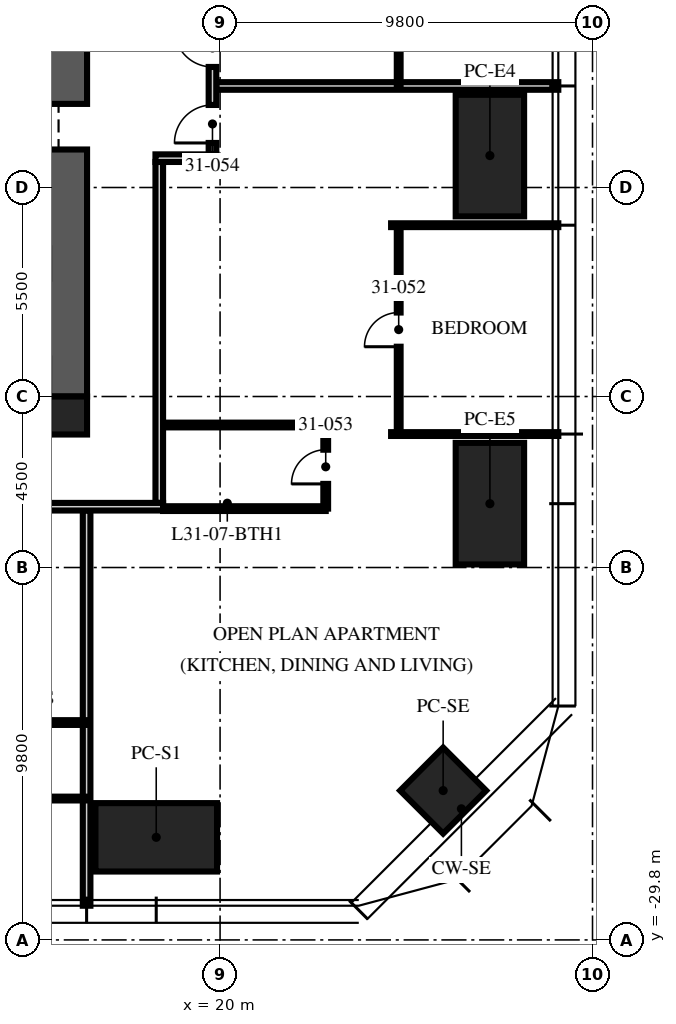
"""IFC4 building model, lengths in metres.
Left out: names, types, materials, properties, quantities, classifications, styles, units other than length and angle.
Written with IfcOpenShell. Run it as: python <this file> out.ifc"""

import sys

from ifc_helpers import new_model, si_unit, direction, frame, frame_2d, origin, origin_2d, place, context, subcontext, project, spatial, rectangle, extrude, element, fill, save


model = new_model("IFC4")
c1 = context("Model", 3, precision=1e-05, world=origin(), true_north=direction((0.0, 1.0)))
c2 = subcontext(c1, "Body", "Model", "MODEL_VIEW")
j1 = project(units=[si_unit("LENGTHUNIT", "METRE"), si_unit("PLANEANGLEUNIT", "RADIAN")], contexts=[c1])
p1 = place(None, origin())
s1 = spatial("IfcSite", under=j1, at=p1, CompositionType="ELEMENT")
p2 = place(p1, origin())
s2 = spatial("IfcBuilding", under=s1, at=p2, CompositionType="ELEMENT")
p3 = place(p2, frame((0.0, 0.0, 126.0)))
s3 = spatial("IfcBuildingStorey", under=s2, at=p3, CompositionType="ELEMENT", Elevation=126.0)
p4 = place(p3, frame((15.5, -15.5, -0.25), z_axis=(0.0, 0.0, 1.0), x_axis=(0.0, 1.0, 0.0)))
e1 = element("IfcWall", 1, at=p4, inside=s3, PredefinedType="SHEAR", context=c2, shape_type="SweptSolid", body=[
    extrude(rectangle(XDim=31.0, YDim=2.0, at=frame_2d((15.5, 0.0))), origin(), (0.0, 0.0, 1.0), 3.75),
])
p5 = place(p4, frame((6.5, 0.0, 0.25)))
e2 = element("IfcOpeningElement", 2, at=p5, cuts=e1, PredefinedType="OPENING", context=c2, shape_type="SweptSolid", body=[
    extrude(rectangle(XDim=1.2, YDim=2.1, at=frame_2d((0.6, 1.05))), frame((0.0, 1.01, 0.0), z_axis=(0.0, -1.0, 0.0), x_axis=(1.0, 0.0, 0.0)), (0.0, 0.0, 1.0), 2.02),
])
p6 = place(p4, frame((23.0, 0.0, 0.25)))
e3 = element("IfcOpeningElement", 3, at=p6, cuts=e1, PredefinedType="OPENING", context=c2, shape_type="SweptSolid", body=[
    extrude(rectangle(XDim=1.8, YDim=2.1, at=frame_2d((0.9, 1.05))), frame((0.0, 1.01, 0.0), z_axis=(0.0, -1.0, 0.0), x_axis=(1.0, 0.0, 0.0)), (0.0, 0.0, 1.0), 2.02),
])
p7 = place(p3, frame((16.0, -16.0, -0.25), z_axis=(0.0, 0.0, 1.0), x_axis=(1.0, 0.0, 0.0)))
e4 = element("IfcColumn", 4, at=p7, inside=s3, PredefinedType="COLUMN", context=c2, shape_type="SweptSolid", body=[
    extrude(rectangle(XDim=1.0, YDim=1.0, at=origin_2d()), origin(), (0.0, 0.0, 1.0), 3.75),
])
for number, where, z_axis, x_axis in (
    (5, (27.1, -9.16, 0.0), (0.0, 0.0, 1.0), (0.0, 1.0, 0.0)),
    (6, (27.1, -18.32, 0.0), (0.0, 0.0, 1.0), (0.0, 1.0, 0.0)),
    (7, (18.32, -27.1, 0.0), (0.0, 0.0, 1.0), (1.0, 0.0, 0.0)),
):
    element("IfcColumn", number, at=place(p3, frame(where, z_axis=z_axis, x_axis=x_axis)), inside=s3, PredefinedType="COLUMN", context=c2, shape_type="SweptSolid", body=[
        extrude(rectangle(XDim=3.2, YDim=1.8, at=origin_2d()), origin(), (0.0, 0.0, 1.0), 3.75),
    ])
p8 = place(p3, frame((25.87, -25.87, 0.0), z_axis=(0.0, 0.0, 1.0), x_axis=(0.707106781187, 0.707106781187, 0.0)))
e8 = element("IfcColumn", 8, at=p8, inside=s3, PredefinedType="COLUMN", context=c2, shape_type="SweptSolid", body=[
    extrude(rectangle(XDim=1.6, YDim=1.6, at=origin_2d()), origin(), (0.0, 0.0, 1.0), 3.75),
])
p9 = place(p3, frame((19.9, -7.328, 0.0), z_axis=(0.0, 0.0, 1.0), x_axis=(1.0, 0.0, 0.0)))
e9 = element("IfcWall", 9, at=p9, inside=s3, PredefinedType="PARTITIONING", context=c2, shape_type="SweptSolid", body=[
    extrude(rectangle(XDim=9.0, YDim=0.2, at=frame_2d((4.5, 0.0))), origin(), (0.0, 0.0, 1.0), 2.81),
])
p10 = place(p3, frame((16.488, -18.5, 0.0), z_axis=(0.0, 0.0, 1.0), x_axis=(0.0, -1.0, 0.0)))
e10 = element("IfcWall", 10, at=p10, inside=s3, PredefinedType="PARTITIONING", context=c2, shape_type="SweptSolid", body=[
    extrude(rectangle(XDim=10.4, YDim=0.2, at=frame_2d((5.2, 0.0))), origin(), (0.0, 0.0, 1.0), 2.81),
])
for number, where, z_axis, x_axis in (
    (11, (24.5, -16.488, 0.0), (0.0, 0.0, 1.0), (1.0, 0.0, 0.0)),
    (12, (24.5, -10.992, 0.0), (0.0, 0.0, 1.0), (1.0, 0.0, 0.0)),
):
    element("IfcWall", number, at=place(p3, frame(where, z_axis=z_axis, x_axis=x_axis)), inside=s3, PredefinedType="PARTITIONING", context=c2, shape_type="SweptSolid", body=[
        extrude(rectangle(XDim=4.4, YDim=0.1, at=frame_2d((2.2, 0.0))), origin(), (0.0, 0.0, 1.0), 2.81),
    ])
p11 = place(p3, frame((24.7, -7.328, 0.0), z_axis=(0.0, 0.0, 1.0), x_axis=(0.0, 1.0, 0.0)))
e13 = element("IfcWall", 13, at=p11, inside=s3, PredefinedType="PARTITIONING", context=c2, shape_type="SweptSolid", body=[
    extrude(rectangle(XDim=5.496, YDim=0.1, at=frame_2d((2.748, 0.0))), origin(), (0.0, 0.0, 1.0), 2.81),
])
p12 = place(p11, frame((2.298, 0.0, 0.0)))
e14 = element("IfcOpeningElement", 14, at=p12, cuts=e13, PredefinedType="OPENING", context=c2, shape_type="SweptSolid", body=[
    extrude(rectangle(XDim=0.9, YDim=2.1, at=frame_2d((0.45, 1.05))), frame((0.0, 0.06, 0.0), z_axis=(0.0, -1.0, 0.0), x_axis=(1.0, 0.0, 0.0)), (0.0, 0.0, 1.0), 0.12),
])
p13 = place(p3, frame((10.992, -26.08, 0.0), z_axis=(0.0, 0.0, 1.0), x_axis=(1.0, 0.0, 0.0)))
e15 = element("IfcWall", 15, at=p13, inside=s3, PredefinedType="PARTITIONING", context=c2, shape_type="SweptSolid", body=[
    extrude(rectangle(XDim=5.496, YDim=0.1, at=frame_2d((2.748, 0.0))), origin(), (0.0, 0.0, 1.0), 2.81),
])
p14 = place(p13, frame((0.15, 0.0, 0.0)))
e16 = element("IfcOpeningElement", 16, at=p14, cuts=e15, PredefinedType="OPENING", context=c2, shape_type="SweptSolid", body=[
    extrude(rectangle(XDim=0.9, YDim=2.1, at=frame_2d((0.45, 1.05))), frame((0.0, 0.06, 0.0), z_axis=(0.0, -1.0, 0.0), x_axis=(1.0, 0.0, 0.0)), (0.0, 0.0, 1.0), 0.12),
])
p15 = place(p13, frame((2.898, 0.0, 0.0)))
e17 = element("IfcOpeningElement", 17, at=p15, cuts=e15, PredefinedType="OPENING", context=c2, shape_type="SweptSolid", body=[
    extrude(rectangle(XDim=0.9, YDim=2.1, at=frame_2d((0.45, 1.05))), frame((0.0, 0.06, 0.0), z_axis=(0.0, -1.0, 0.0), x_axis=(1.0, 0.0, 0.0)), (0.0, 0.0, 1.0), 0.12),
])
p16 = place(p3, frame((12.192, -24.08, 0.0), z_axis=(0.0, 0.0, 1.0), x_axis=(1.0, 0.0, 0.0)))
e18 = element("IfcWall", 18, at=p16, inside=s3, PredefinedType="PARTITIONING", context=c2, shape_type="SweptSolid", body=[
    extrude(rectangle(XDim=4.296, YDim=0.125, at=frame_2d((2.148, 0.0))), origin(), (0.0, 0.0, 1.0), 2.81),
])
p17 = place(p3, frame((24.7, -16.488, 0.0), z_axis=(0.0, 0.0, 1.0), x_axis=(0.0, 1.0, 0.0)))
e19 = element("IfcWall", 19, at=p17, inside=s3, PredefinedType="PARTITIONING", context=c2, shape_type="SweptSolid", body=[
    extrude(rectangle(XDim=5.496, YDim=0.1, at=frame_2d((2.748, 0.0))), origin(), (0.0, 0.0, 1.0), 2.81),
])
p18 = place(p17, frame((2.298, 0.0, 0.0)))
e20 = element("IfcOpeningElement", 20, at=p18, cuts=e19, PredefinedType="OPENING", context=c2, shape_type="SweptSolid", body=[
    extrude(rectangle(XDim=0.9, YDim=2.1, at=frame_2d((0.45, 1.05))), frame((0.0, 0.06, 0.0), z_axis=(0.0, -1.0, 0.0), x_axis=(1.0, 0.0, 0.0)), (0.0, 0.0, 1.0), 0.12),
])
p19 = place(p3, frame((22.78, -18.45, 0.0), z_axis=(0.0, 0.0, 1.0), x_axis=(0.0, 1.0, 0.0)))
e21 = element("IfcWall", 21, at=p19, inside=s3, PredefinedType="PARTITIONING", context=c2, shape_type="SweptSolid", body=[
    extrude(rectangle(XDim=2.2, YDim=0.125, at=frame_2d((1.1, 0.0))), origin(), (0.0, 0.0, 1.0), 2.7),
])
p20 = place(p19, frame((0.65, 0.0, 0.0)))
e22 = element("IfcOpeningElement", 22, at=p20, cuts=e21, PredefinedType="OPENING", context=c2, shape_type="SweptSolid", body=[
    extrude(rectangle(XDim=0.9, YDim=2.1, at=frame_2d((0.45, 1.05))), frame((0.0, 0.073, 0.0), z_axis=(0.0, -1.0, 0.0), x_axis=(1.0, 0.0, 0.0)), (0.0, 0.0, 1.0), 0.145),
])
p21 = place(p3, frame((18.5, -18.45, 0.0), z_axis=(0.0, 0.0, 1.0), x_axis=(1.0, 0.0, 0.0)))
e23 = element("IfcWall", 23, at=p21, inside=s3, PredefinedType="PARTITIONING", context=c2, shape_type="SweptSolid", body=[
    extrude(rectangle(XDim=4.28, YDim=0.125, at=frame_2d((2.14, 0.0))), origin(), (0.0, 0.0, 1.0), 2.3),
])
p22 = place(p3, frame((18.5, -16.25, 0.0), z_axis=(0.0, 0.0, 1.0), x_axis=(1.0, 0.0, 0.0)))
e24 = element("IfcWall", 24, at=p22, inside=s3, PredefinedType="PARTITIONING", context=c2, shape_type="SweptSolid", body=[
    extrude(rectangle(XDim=4.28, YDim=0.125, at=frame_2d((2.14, 0.0))), origin(), (0.0, 0.0, 1.0), 3.5),
])
p23 = place(p3, frame((18.4, -18.3, 0.0), z_axis=(0.0, 0.0, 1.0), x_axis=(0.0, 1.0, 0.0)))
e25 = element("IfcWall", 25, at=p23, inside=s3, PredefinedType="PARTITIONING", context=c2, shape_type="SweptSolid", body=[
    extrude(rectangle(XDim=8.972, YDim=0.2, at=frame_2d((4.486, 0.0))), origin(), (0.0, 0.0, 1.0), 2.3),
])
p24 = place(p3, frame((18.3, -9.228, 0.0), z_axis=(0.0, 0.0, 1.0), x_axis=(1.0, 0.0, 0.0)))
e26 = element("IfcWall", 26, at=p24, inside=s3, PredefinedType="PARTITIONING", context=c2, shape_type="SweptSolid", body=[
    extrude(rectangle(XDim=1.6, YDim=0.2, at=frame_2d((0.8, 0.0))), origin(), (0.0, 0.0, 1.0), 2.7),
])
p25 = place(p3, frame((19.8, -9.128, 0.0), z_axis=(0.0, 0.0, 1.0), x_axis=(0.0, 1.0, 0.0)))
e27 = element("IfcWall", 27, at=p25, inside=s3, PredefinedType="PARTITIONING", context=c2, shape_type="SweptSolid", body=[
    extrude(rectangle(XDim=3.6, YDim=0.2, at=frame_2d((1.8, 0.0))), origin(), (0.0, 0.0, 1.0), 2.7),
])
p26 = place(p25, frame((2.3, 0.0, 0.0)))
e28 = element("IfcOpeningElement", 28, at=p26, cuts=e27, PredefinedType="OPENING", context=c2, shape_type="SweptSolid", body=[
    extrude(rectangle(XDim=1.0, YDim=2.2, at=frame_2d((0.5, 1.1))), frame((0.0, 0.11, 0.0), z_axis=(0.0, -1.0, 0.0), x_axis=(1.0, 0.0, 0.0)), (0.0, 0.0, 1.0), 0.22),
])
p27 = place(p25, frame((0.3, 0.0, 0.0)))
e29 = element("IfcOpeningElement", 29, at=p27, cuts=e27, PredefinedType="OPENING", context=c2, shape_type="SweptSolid", body=[
    extrude(rectangle(XDim=1.0, YDim=2.2, at=frame_2d((0.5, 1.1))), frame((0.0, 0.11, 0.0), z_axis=(0.0, -1.0, 0.0), x_axis=(1.0, 0.0, 0.0)), (0.0, 0.0, 1.0), 0.22),
])
p28 = place(p3, frame((18.5, -18.4, 0.0), z_axis=(0.0, 0.0, 1.0), x_axis=(-1.0, 0.0, 0.0)))
e30 = element("IfcWall", 30, at=p28, inside=s3, PredefinedType="PARTITIONING", context=c2, shape_type="SweptSolid", body=[
    extrude(rectangle(XDim=12.9, YDim=0.2, at=frame_2d((6.45, 0.0))), origin(), (0.0, 0.0, 1.0), 2.3),
])
p29 = place(p26, origin())
e31 = element("IfcDoor", 31, at=p29, inside=s3, OperationType="SINGLE_SWING_RIGHT", PredefinedType="DOOR", context=c2, shape_type="SweptSolid", body=[
    extrude(rectangle(XDim=1.0, YDim=2.2, at=frame_2d((0.5, 1.1))), frame((0.0, 0.025, 0.0), z_axis=(0.0, -1.0, 0.0), x_axis=(1.0, 0.0, 0.0)), (0.0, 0.0, 1.0), 0.05),
])
fill(e28, e31)
p30 = place(p18, origin())
e32 = element("IfcDoor", 32, at=p30, inside=s3, OperationType="SINGLE_SWING_LEFT", PredefinedType="DOOR", context=c2, shape_type="SweptSolid", body=[
    extrude(rectangle(XDim=0.9, YDim=2.1, at=frame_2d((0.45, 1.05))), frame((0.0, 0.025, 0.0), z_axis=(0.0, -1.0, 0.0), x_axis=(1.0, 0.0, 0.0)), (0.0, 0.0, 1.0), 0.05),
])
fill(e20, e32)
p31 = place(p20, origin())
e33 = element("IfcDoor", 33, at=p31, inside=s3, OperationType="SINGLE_SWING_LEFT", PredefinedType="DOOR", context=c2, shape_type="SweptSolid", body=[
    extrude(rectangle(XDim=0.9, YDim=2.1, at=frame_2d((0.45, 1.05))), frame((0.0, 0.025, 0.0), z_axis=(0.0, -1.0, 0.0), x_axis=(1.0, 0.0, 0.0)), (0.0, 0.0, 1.0), 0.05),
])
fill(e22, e33)
p32 = place(p27, origin())
e34 = element("IfcDoor", 34, at=p32, inside=s3, OperationType="SINGLE_SWING_LEFT", PredefinedType="DOOR", context=c2, shape_type="SweptSolid", body=[
    extrude(rectangle(XDim=1.0, YDim=2.2, at=frame_2d((0.5, 1.1))), frame((0.0, 0.025, 0.0), z_axis=(0.0, -1.0, 0.0), x_axis=(1.0, 0.0, 0.0)), (0.0, 0.0, 1.0), 0.05),
])
fill(e29, e34)
save(model, sys.argv[1])
